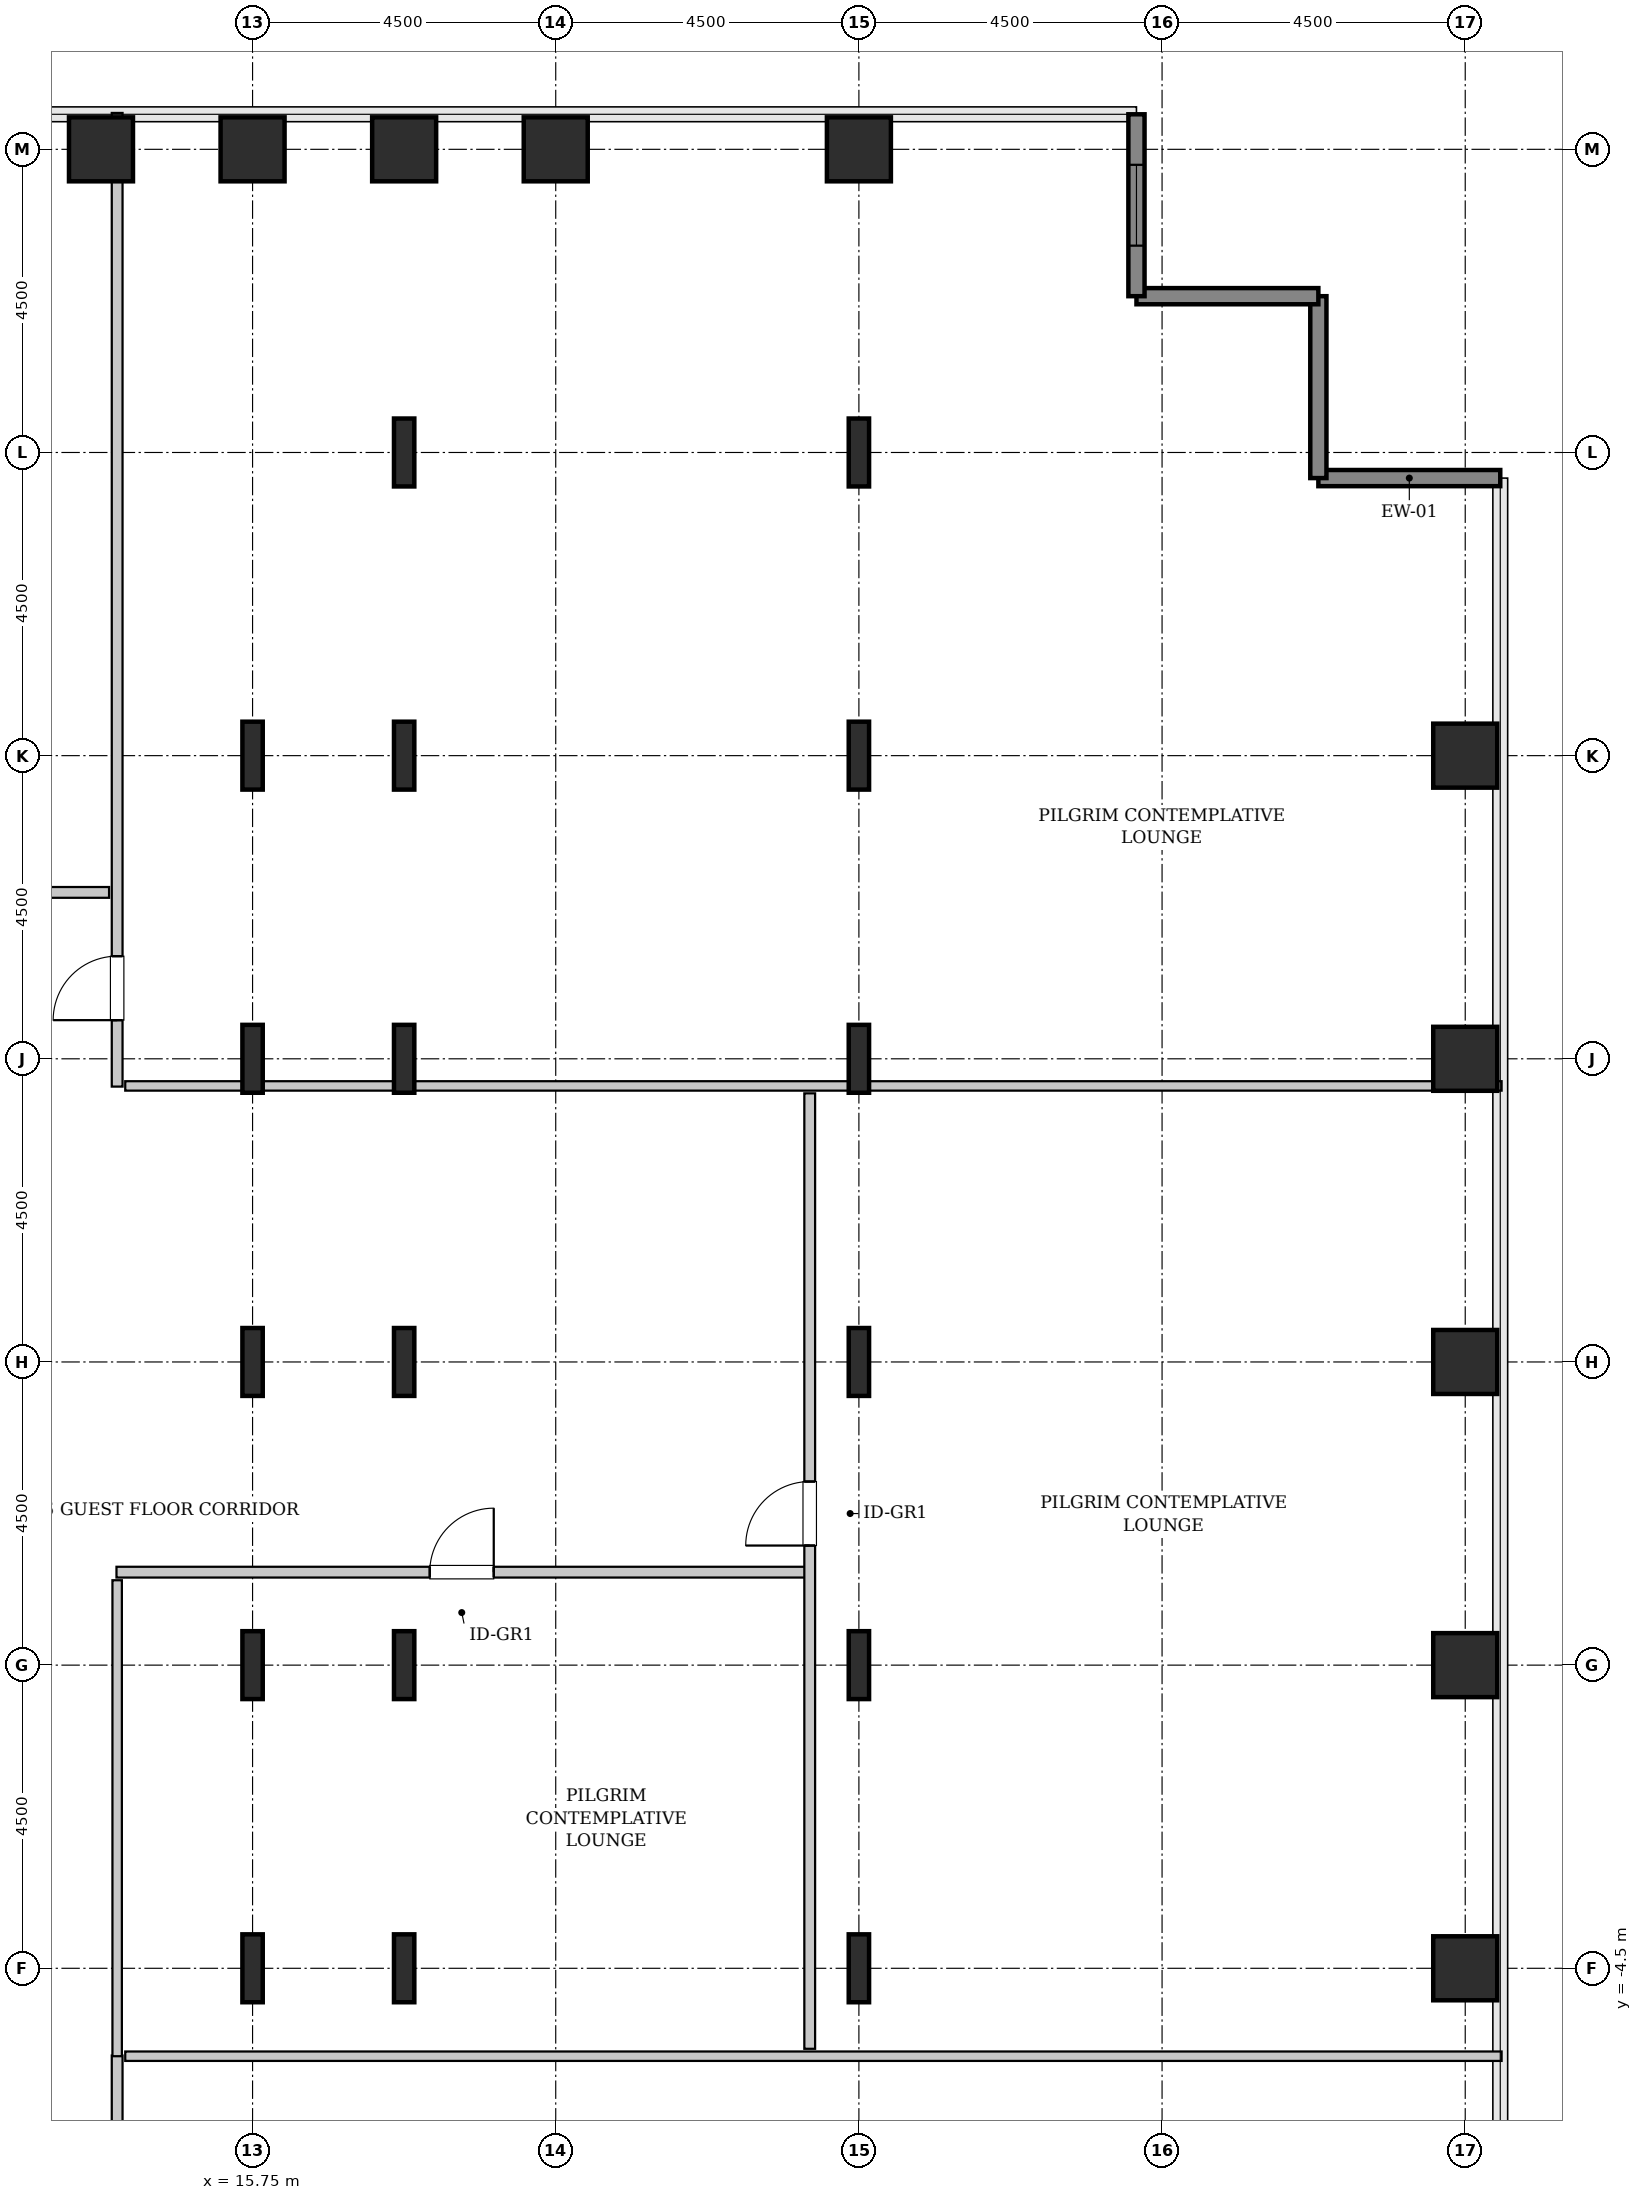
"""IFC4 building model, lengths in metres.
Left out: names, types, materials, properties, quantities, classifications, styles, units other than length and angle.
Written with IfcOpenShell. Run it as: python <this file> out.ifc"""

import sys

from ifc_helpers import new_model, si_unit, direction, frame, frame_2d, origin, origin_2d, place, context, subcontext, project, spatial, rectangle, hollow_rectangle, i_section, extrude, source, transform, mapped, element, fill, save


model = new_model("IFC4")
c1 = context("Model", 3, precision=1e-05, world=origin(), true_north=direction((0.0, 1.0)))
c2 = subcontext(c1, "Body", "Model", "MODEL_VIEW")
j1 = project(units=[si_unit("LENGTHUNIT", "METRE"), si_unit("PLANEANGLEUNIT", "RADIAN")], contexts=[c1])
p1 = place(None, origin())
s1 = spatial("IfcSite", under=j1, at=p1, CompositionType="ELEMENT")
p2 = place(p1, origin())
s2 = spatial("IfcBuilding", under=s1, at=p2, CompositionType="ELEMENT")
p3 = place(p2, frame((0.0, 0.0, 71.0)))
s3 = spatial("IfcBuildingStorey", under=s2, at=p3, CompositionType="ELEMENT", Elevation=71.0)
m1 = source(origin(), c2, "Body", "SweptSolid", [
    extrude(hollow_rectangle(XDim=0.95, YDim=0.95, WallThickness=0.045, InnerFilletRadius=0.045, OuterFilletRadius=0.09, at=origin_2d()), origin(), (0.0, 0.0, 1.0), 3.8),
])
p4 = place(p3, frame((13.5, 22.5, 0.0), z_axis=(0.0, 0.0, 1.0), x_axis=(1.0, 0.0, 0.0)))
e1 = element("IfcColumn", 1, at=p4, inside=s3, PredefinedType="COLUMN", context=c2, shape_type="MappedRepresentation", body=[
    mapped(m1, transform((0.0, 0.0, 0.0), x_axis=(1.0, 0.0, 0.0), y_axis=(0.0, 1.0, 0.0), z_axis=(0.0, 0.0, 1.0), scale=1.0)),
])
m2 = source(origin(), c2, "Body", "SweptSolid", [
    extrude(i_section(OverallWidth=0.302, OverallDepth=1.008, WebThickness=0.021, FlangeThickness=0.04, FilletRadius=0.03, at=origin_2d()), origin(), (0.0, 0.0, 1.0), 3.8),
])
for number, where, z_axis, x_axis in (
    (2, (15.75, -4.5, 0.0), (0.0, 0.0, 1.0), (1.0, 0.0, 0.0)),
    (3, (15.75, 0.0, 0.0), (0.0, 0.0, 1.0), (1.0, 0.0, 0.0)),
    (4, (15.75, 4.5, 0.0), (0.0, 0.0, 1.0), (1.0, 0.0, 0.0)),
    (5, (15.75, 9.0, 0.0), (0.0, 0.0, 1.0), (1.0, 0.0, 0.0)),
    (6, (15.75, 13.5, 0.0), (0.0, 0.0, 1.0), (1.0, 0.0, 0.0)),
):
    element("IfcColumn", number, at=place(p3, frame(where, z_axis=z_axis, x_axis=x_axis)), inside=s3, PredefinedType="COLUMN", context=c2, shape_type="MappedRepresentation", body=[
        mapped(m2, transform((0.0, 0.0, 0.0), x_axis=(1.0, 0.0, 0.0), y_axis=(0.0, 1.0, 0.0), z_axis=(0.0, 0.0, 1.0), scale=1.0)),
    ])
p5 = place(p3, frame((15.75, 22.5, 0.0), z_axis=(0.0, 0.0, 1.0), x_axis=(1.0, 0.0, 0.0)))
e7 = element("IfcColumn", 7, at=p5, inside=s3, PredefinedType="COLUMN", context=c2, shape_type="MappedRepresentation", body=[
    mapped(m1, transform((0.0, 0.0, 0.0), x_axis=(1.0, 0.0, 0.0), y_axis=(0.0, 1.0, 0.0), z_axis=(0.0, 0.0, 1.0), scale=1.0)),
])
for number, where, z_axis, x_axis in (
    (8, (18.0, -4.5, 0.0), (0.0, 0.0, 1.0), (1.0, 0.0, 0.0)),
    (9, (18.0, 0.0, 0.0), (0.0, 0.0, 1.0), (1.0, 0.0, 0.0)),
    (10, (18.0, 4.5, 0.0), (0.0, 0.0, 1.0), (1.0, 0.0, 0.0)),
    (11, (18.0, 9.0, 0.0), (0.0, 0.0, 1.0), (1.0, 0.0, 0.0)),
    (12, (18.0, 13.5, 0.0), (0.0, 0.0, 1.0), (1.0, 0.0, 0.0)),
    (13, (18.0, 18.0, 0.0), (0.0, 0.0, 1.0), (1.0, 0.0, 0.0)),
):
    element("IfcColumn", number, at=place(p3, frame(where, z_axis=z_axis, x_axis=x_axis)), inside=s3, PredefinedType="COLUMN", context=c2, shape_type="MappedRepresentation", body=[
        mapped(m2, transform((0.0, 0.0, 0.0), x_axis=(1.0, 0.0, 0.0), y_axis=(0.0, 1.0, 0.0), z_axis=(0.0, 0.0, 1.0), scale=1.0)),
    ])
for number, where, z_axis, x_axis in (
    (14, (18.0, 22.5, 0.0), (0.0, 0.0, 1.0), (1.0, 0.0, 0.0)),
    (15, (20.25, 22.5, 0.0), (0.0, 0.0, 1.0), (1.0, 0.0, 0.0)),
):
    element("IfcColumn", number, at=place(p3, frame(where, z_axis=z_axis, x_axis=x_axis)), inside=s3, PredefinedType="COLUMN", context=c2, shape_type="MappedRepresentation", body=[
        mapped(m1, transform((0.0, 0.0, 0.0), x_axis=(1.0, 0.0, 0.0), y_axis=(0.0, 1.0, 0.0), z_axis=(0.0, 0.0, 1.0), scale=1.0)),
    ])
for number, where, z_axis, x_axis in (
    (16, (24.75, -4.5, 0.0), (0.0, 0.0, 1.0), (1.0, 0.0, 0.0)),
    (17, (24.75, 0.0, 0.0), (0.0, 0.0, 1.0), (1.0, 0.0, 0.0)),
    (18, (24.75, 4.5, 0.0), (0.0, 0.0, 1.0), (1.0, 0.0, 0.0)),
    (19, (24.75, 9.0, 0.0), (0.0, 0.0, 1.0), (1.0, 0.0, 0.0)),
    (20, (24.75, 13.5, 0.0), (0.0, 0.0, 1.0), (1.0, 0.0, 0.0)),
    (21, (24.75, 18.0, 0.0), (0.0, 0.0, 1.0), (1.0, 0.0, 0.0)),
):
    element("IfcColumn", number, at=place(p3, frame(where, z_axis=z_axis, x_axis=x_axis)), inside=s3, PredefinedType="COLUMN", context=c2, shape_type="MappedRepresentation", body=[
        mapped(m2, transform((0.0, 0.0, 0.0), x_axis=(1.0, 0.0, 0.0), y_axis=(0.0, 1.0, 0.0), z_axis=(0.0, 0.0, 1.0), scale=1.0)),
    ])
for number, where, z_axis, x_axis in (
    (22, (24.75, 22.5, 0.0), (0.0, 0.0, 1.0), (1.0, 0.0, 0.0)),
    (23, (33.75, -4.5, 0.0), (0.0, 0.0, 1.0), (1.0, 0.0, 0.0)),
    (24, (33.75, 0.0, 0.0), (0.0, 0.0, 1.0), (1.0, 0.0, 0.0)),
    (25, (33.75, 4.5, 0.0), (0.0, 0.0, 1.0), (1.0, 0.0, 0.0)),
    (26, (33.75, 9.0, 0.0), (0.0, 0.0, 1.0), (1.0, 0.0, 0.0)),
    (27, (33.75, 13.5, 0.0), (0.0, 0.0, 1.0), (1.0, 0.0, 0.0)),
):
    element("IfcColumn", number, at=place(p3, frame(where, z_axis=z_axis, x_axis=x_axis)), inside=s3, PredefinedType="COLUMN", context=c2, shape_type="MappedRepresentation", body=[
        mapped(m1, transform((0.0, 0.0, 0.0), x_axis=(1.0, 0.0, 0.0), y_axis=(0.0, 1.0, 0.0), z_axis=(0.0, 0.0, 1.0), scale=1.0)),
    ])
m3 = source(origin(), c2, "Body", "SweptSolid", [
    extrude(rectangle(XDim=2.7, YDim=0.24, at=frame_2d((1.35, 0.0))), origin(), (0.0, 0.0, 1.0), 3.55),
])
for number, where, z_axis, x_axis in (
    (28, (34.27, 17.62, 0.0), (0.0, 0.0, 1.0), (-1.0, 0.0, 0.0)),
    (29, (31.57, 17.62, 0.0), (0.0, 0.0, 1.0), (0.0, 1.0, 0.0)),
    (30, (31.57, 20.32, 0.0), (0.0, 0.0, 1.0), (-1.0, 0.0, 0.0)),
):
    element("IfcWall", number, at=place(p3, frame(where, z_axis=z_axis, x_axis=x_axis)), inside=s3, PredefinedType="SHEAR", context=c2, shape_type="MappedRepresentation", body=[
        mapped(m3, transform((0.0, 0.0, 0.0), x_axis=(1.0, 0.0, 0.0), y_axis=(0.0, 1.0, 0.0), z_axis=(0.0, 0.0, 1.0), scale=1.0)),
    ])
p6 = place(p3, frame((28.87, 20.32, 0.0), z_axis=(0.0, 0.0, 1.0), x_axis=(0.0, 1.0, 0.0)))
e31 = element("IfcWall", 31, at=p6, inside=s3, PredefinedType="SHEAR", context=c2, shape_type="MappedRepresentation", body=[
    mapped(m3, transform((0.0, 0.0, 0.0), x_axis=(1.0, 0.0, 0.0), y_axis=(0.0, 1.0, 0.0), z_axis=(0.0, 0.0, 1.0), scale=1.0)),
])
p7 = place(p6, frame((0.75, 0.0, 0.85)))
e32 = element("IfcOpeningElement", 32, at=p7, cuts=e31, PredefinedType="OPENING", context=c2, shape_type="SweptSolid", body=[
    extrude(rectangle(XDim=1.2, YDim=1.8, at=frame_2d((0.6, 0.9))), frame((0.0, 0.13, 0.0), z_axis=(0.0, -1.0, 0.0), x_axis=(1.0, 0.0, 0.0)), (0.0, 0.0, 1.0), 0.26),
])
m4 = source(origin(), c2, "Body", "SweptSolid", [
    extrude(rectangle(XDim=17.245, YDim=0.16, at=frame_2d((8.623, 0.0))), origin(), (0.0, 0.0, 1.0), 3.535),
])
p8 = place(p3, frame((13.74, -23.04, 0.0), z_axis=(0.0, 0.0, 1.0), x_axis=(0.0, 1.0, 0.0)))
e33 = element("IfcWall", 33, at=p8, inside=s3, PredefinedType="PARTITIONING", context=c2, shape_type="MappedRepresentation", body=[
    mapped(m4, transform((0.0, 0.0, 0.0), x_axis=(1.0, 0.0, 0.0), y_axis=(0.0, 1.0, 0.0), z_axis=(0.0, 0.0, 1.0), scale=1.0)),
])
p9 = place(p8, frame((13.913, 0.0, 0.0)))
e34 = element("IfcOpeningElement", 34, at=p9, cuts=e33, PredefinedType="OPENING", context=c2, shape_type="SweptSolid", body=[
    extrude(rectangle(XDim=0.95, YDim=2.1, at=frame_2d((0.475, 1.05))), frame((0.0, 0.09, 0.0), z_axis=(0.0, -1.0, 0.0), x_axis=(1.0, 0.0, 0.0)), (0.0, 0.0, 1.0), 0.18),
])
m5 = source(origin(), c2, "Body", "SweptSolid", [
    extrude(rectangle(XDim=20.43, YDim=0.14, at=frame_2d((10.215, 0.0))), origin(), (0.0, 0.0, 1.0), 3.535),
])
p10 = place(p3, frame((13.86, -5.805, 0.0), z_axis=(0.0, 0.0, 1.0), x_axis=(1.0, 0.0, 0.0)))
e35 = element("IfcWall", 35, at=p10, inside=s3, PredefinedType="PARTITIONING", context=c2, shape_type="MappedRepresentation", body=[
    mapped(m5, transform((0.0, 0.0, 0.0), x_axis=(1.0, 0.0, 0.0), y_axis=(0.0, 1.0, 0.0), z_axis=(0.0, 0.0, 1.0), scale=1.0)),
])
m6 = source(origin(), c2, "Body", "SweptSolid", [
    extrude(rectangle(XDim=14.453, YDim=0.16, at=frame_2d((7.226, 0.0))), origin(), (0.0, 0.0, 1.0), 3.535),
])
p11 = place(p3, frame((13.74, 8.587, 0.0), z_axis=(0.0, 0.0, 1.0), x_axis=(0.0, 1.0, 0.0)))
e36 = element("IfcWall", 36, at=p11, inside=s3, PredefinedType="PARTITIONING", context=c2, shape_type="MappedRepresentation", body=[
    mapped(m6, transform((0.0, 0.0, 0.0), x_axis=(1.0, 0.0, 0.0), y_axis=(0.0, 1.0, 0.0), z_axis=(0.0, 0.0, 1.0), scale=1.0)),
])
p12 = place(p11, frame((0.986, 0.0, 0.0)))
e37 = element("IfcOpeningElement", 37, at=p12, cuts=e36, PredefinedType="OPENING", context=c2, shape_type="SweptSolid", body=[
    extrude(rectangle(XDim=0.95, YDim=2.1, at=frame_2d((0.475, 1.05))), frame((0.0, 0.09, 0.0), z_axis=(0.0, -1.0, 0.0), x_axis=(1.0, 0.0, 0.0)), (0.0, 0.0, 1.0), 0.18),
])
m7 = source(origin(), c2, "Body", "SweptSolid", [
    extrude(rectangle(XDim=20.43, YDim=0.14, at=frame_2d((10.215, 0.0))), origin(), (0.0, 0.0, 1.0), 2.825),
])
p13 = place(p3, frame((13.86, 8.597, 0.0), z_axis=(0.0, 0.0, 1.0), x_axis=(1.0, 0.0, 0.0)))
e38 = element("IfcWall", 38, at=p13, inside=s3, PredefinedType="PARTITIONING", context=c2, shape_type="MappedRepresentation", body=[
    mapped(m7, transform((0.0, 0.0, 0.0), x_axis=(1.0, 0.0, 0.0), y_axis=(0.0, 1.0, 0.0), z_axis=(0.0, 0.0, 1.0), scale=1.0)),
])
m8 = source(origin(), c2, "Body", "SweptSolid", [
    extrude(rectangle(XDim=10.25, YDim=0.16, at=frame_2d((5.125, 0.0))), origin(), (0.0, 0.0, 1.0), 3.535),
])
p14 = place(p3, frame((13.73, 1.38, 0.0), z_axis=(0.0, 0.0, 1.0), x_axis=(1.0, 0.0, 0.0)))
e39 = element("IfcWall", 39, at=p14, inside=s3, PredefinedType="PARTITIONING", context=c2, shape_type="MappedRepresentation", body=[
    mapped(m8, transform((0.0, 0.0, 0.0), x_axis=(1.0, 0.0, 0.0), y_axis=(0.0, 1.0, 0.0), z_axis=(0.0, 0.0, 1.0), scale=1.0)),
])
p15 = place(p14, frame((4.65, 0.0, 0.0)))
e40 = element("IfcOpeningElement", 40, at=p15, cuts=e39, PredefinedType="OPENING", context=c2, shape_type="SweptSolid", body=[
    extrude(rectangle(XDim=0.95, YDim=2.1, at=frame_2d((0.475, 1.05))), frame((0.0, 0.09, 0.0), z_axis=(0.0, -1.0, 0.0), x_axis=(1.0, 0.0, 0.0)), (0.0, 0.0, 1.0), 0.18),
])
m9 = source(origin(), c2, "Body", "SweptSolid", [
    extrude(rectangle(XDim=7.065, YDim=0.14, at=frame_2d((3.532, 0.0))), origin(), (0.0, 0.0, 1.0), 3.535),
])
p16 = place(p3, frame((13.74, -5.805, 0.0), z_axis=(0.0, 0.0, 1.0), x_axis=(0.0, 1.0, 0.0)))
e41 = element("IfcWall", 41, at=p16, inside=s3, PredefinedType="PARTITIONING", context=c2, shape_type="MappedRepresentation", body=[
    mapped(m9, transform((0.0, 0.0, 0.0), x_axis=(1.0, 0.0, 0.0), y_axis=(0.0, 1.0, 0.0), z_axis=(0.0, 0.0, 1.0), scale=1.0)),
])
m10 = source(origin(), c2, "Body", "SweptSolid", [
    extrude(rectangle(XDim=14.183, YDim=0.16, at=frame_2d((7.091, 0.0))), origin(), (0.0, 0.0, 1.0), 3.535),
])
p17 = place(p3, frame((24.02, -5.695, 0.0), z_axis=(0.0, 0.0, 1.0), x_axis=(0.0, 1.0, 0.0)))
e42 = element("IfcWall", 42, at=p17, inside=s3, PredefinedType="PARTITIONING", context=c2, shape_type="MappedRepresentation", body=[
    mapped(m10, transform((0.0, 0.0, 0.0), x_axis=(1.0, 0.0, 0.0), y_axis=(0.0, 1.0, 0.0), z_axis=(0.0, 0.0, 1.0), scale=1.0)),
])
p18 = place(p17, frame((7.47, 0.0, 0.0)))
e43 = element("IfcOpeningElement", 43, at=p18, cuts=e42, PredefinedType="OPENING", context=c2, shape_type="SweptSolid", body=[
    extrude(rectangle(XDim=0.95, YDim=2.1, at=frame_2d((0.475, 1.05))), frame((0.0, 0.09, 0.0), z_axis=(0.0, -1.0, 0.0), x_axis=(1.0, 0.0, 0.0)), (0.0, 0.0, 1.0), 0.18),
])
m11 = source(origin(), c2, "Body", "SweptSolid", [
    extrude(rectangle(XDim=5.225, YDim=0.16, at=frame_2d((2.613, 0.0))), origin(), (0.0, 0.0, 1.0), 3.535),
])
p19 = place(p3, frame((8.395, 11.47, 0.0), z_axis=(0.0, 0.0, 1.0), x_axis=(1.0, 0.0, 0.0)))
e44 = element("IfcWall", 44, at=p19, inside=s3, PredefinedType="PARTITIONING", context=c2, shape_type="MappedRepresentation", body=[
    mapped(m11, transform((0.0, 0.0, 0.0), x_axis=(1.0, 0.0, 0.0), y_axis=(0.0, 1.0, 0.0), z_axis=(0.0, 0.0, 1.0), scale=1.0)),
])
p20 = place(p19, frame((2.137, 0.0, 0.0)))
e45 = element("IfcOpeningElement", 45, at=p20, cuts=e44, PredefinedType="OPENING", context=c2, shape_type="SweptSolid", body=[
    extrude(rectangle(XDim=0.95, YDim=2.1, at=frame_2d((0.475, 1.05))), frame((0.0, 0.09, 0.0), z_axis=(0.0, -1.0, 0.0), x_axis=(1.0, 0.0, 0.0)), (0.0, 0.0, 1.0), 0.18),
])
m12 = source(origin(), c2, "Body", "SweptSolid", [
    extrude(rectangle(XDim=1.2, YDim=1.8, at=frame_2d((0.6, 0.9))), frame((0.0, 0.03, 0.0), z_axis=(0.0, -1.0, 0.0), x_axis=(1.0, 0.0, 0.0)), (0.0, 0.0, 1.0), 0.06),
])
p21 = place(p7, origin())
e46 = element("IfcWindow", 46, at=p21, inside=s3, PartitioningType="SINGLE_PANEL", PredefinedType="WINDOW", context=c2, shape_type="MappedRepresentation", body=[
    mapped(m12, transform((0.0, 0.0, 0.0), x_axis=(1.0, 0.0, 0.0), y_axis=(0.0, 1.0, 0.0), z_axis=(0.0, 0.0, 1.0), scale=1.0)),
])
fill(e32, e46)
m13 = source(origin(), c2, "Body", "SweptSolid", [
    extrude(rectangle(XDim=0.95, YDim=2.1, at=frame_2d((0.475, 1.05))), frame((0.0, 0.025, 0.0), z_axis=(0.0, -1.0, 0.0), x_axis=(1.0, 0.0, 0.0)), (0.0, 0.0, 1.0), 0.05),
])
p22 = place(p12, origin())
e47 = element("IfcDoor", 47, at=p22, inside=s3, OperationType="SINGLE_SWING_LEFT", PredefinedType="DOOR", context=c2, shape_type="MappedRepresentation", body=[
    mapped(m13, transform((0.0, 0.0, 0.0), x_axis=(1.0, 0.0, 0.0), y_axis=(0.0, 1.0, 0.0), z_axis=(0.0, 0.0, 1.0), scale=1.0)),
])
fill(e37, e47)
p23 = place(p15, origin())
e48 = element("IfcDoor", 48, at=p23, inside=s3, OperationType="SINGLE_SWING_RIGHT", PredefinedType="DOOR", context=c2, shape_type="MappedRepresentation", body=[
    mapped(m13, transform((0.0, 0.0, 0.0), x_axis=(1.0, 0.0, 0.0), y_axis=(0.0, 1.0, 0.0), z_axis=(0.0, 0.0, 1.0), scale=1.0)),
])
fill(e40, e48)
p24 = place(p18, origin())
e49 = element("IfcDoor", 49, at=p24, inside=s3, OperationType="SINGLE_SWING_LEFT", PredefinedType="DOOR", context=c2, shape_type="MappedRepresentation", body=[
    mapped(m13, transform((0.0, 0.0, 0.0), x_axis=(1.0, 0.0, 0.0), y_axis=(0.0, 1.0, 0.0), z_axis=(0.0, 0.0, 1.0), scale=1.0)),
])
fill(e43, e49)
save(model, sys.argv[1])
